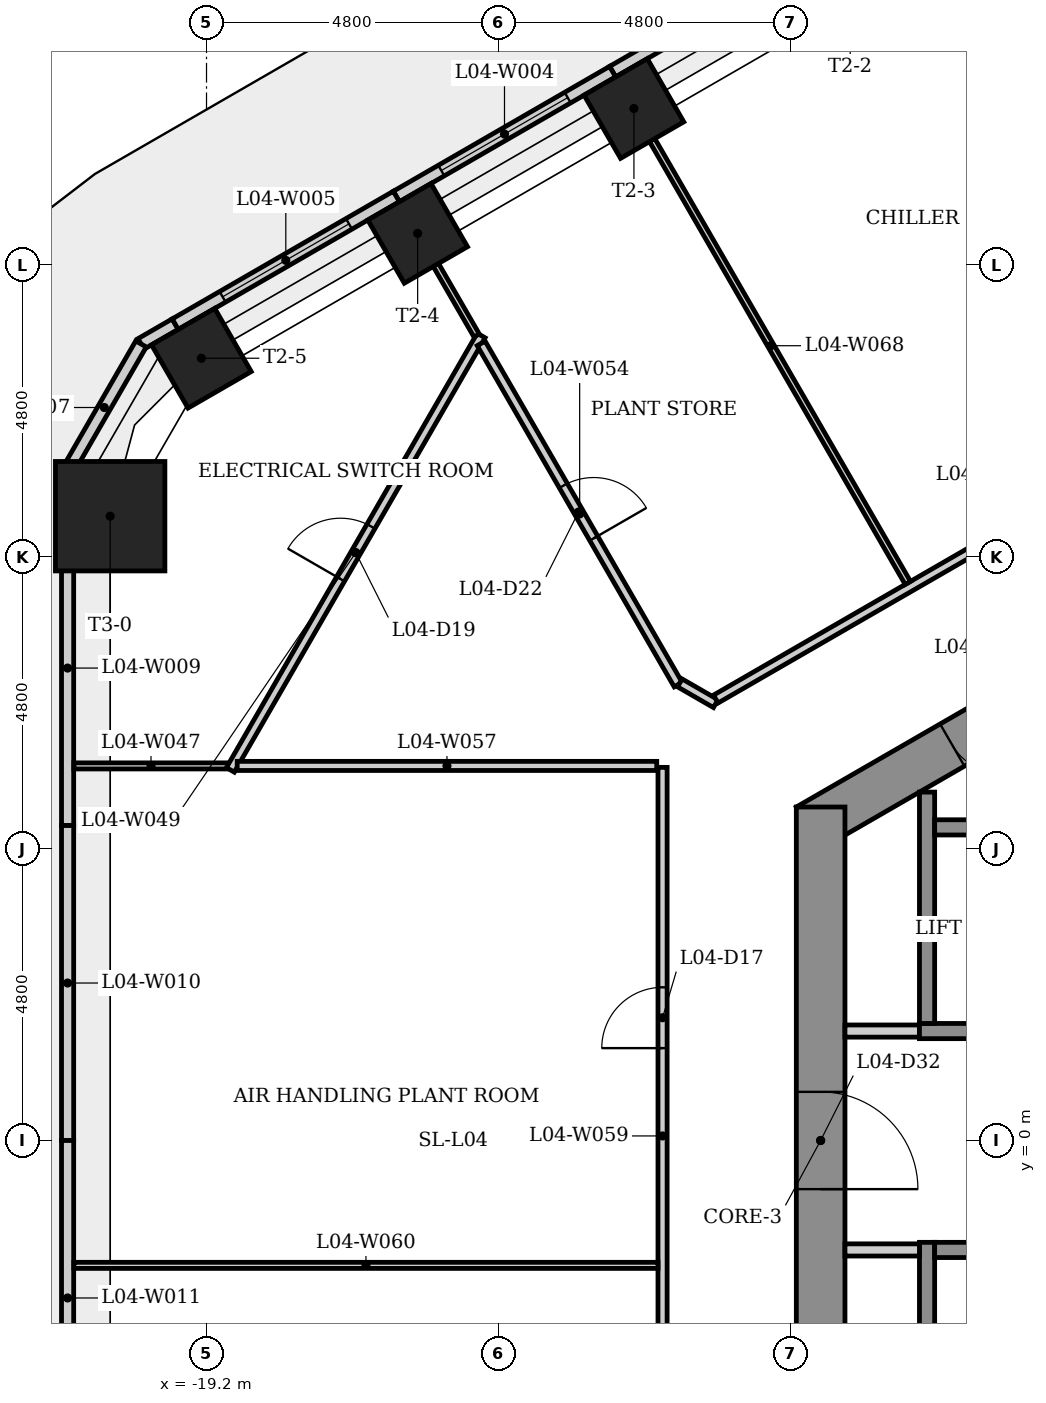
"""IFC4 building model, lengths in metres.
Left out: names, types, materials, properties, quantities, classifications, styles, units other than length and angle.
Written with IfcOpenShell. Run it as: python <this file> out.ifc"""

import sys

from ifc_helpers import new_model, si_unit, direction, frame, frame_2d, origin, origin_2d, place, context, subcontext, project, spatial, rectangle, extrude, element, fill, save


model = new_model("IFC4")
c1 = context("Model", 3, precision=1e-05, world=origin(), true_north=direction((0.0, 1.0)))
c2 = subcontext(c1, "Body", "Model", "MODEL_VIEW")
j1 = project(units=[si_unit("LENGTHUNIT", "METRE"), si_unit("PLANEANGLEUNIT", "RADIAN")], contexts=[c1])
p1 = place(None, origin())
s1 = spatial("IfcSite", under=j1, at=p1, CompositionType="ELEMENT")
p2 = place(p1, origin())
s2 = spatial("IfcBuilding", under=s1, at=p2, CompositionType="ELEMENT")
p3 = place(p2, frame((0.0, 0.0, 20.5)))
s3 = spatial("IfcBuildingStorey", under=s2, at=p3, CompositionType="ELEMENT", Elevation=20.5)
p4 = place(p3, frame((0.2, 10.623, 0.0), z_axis=(0.0, 0.0, 1.0), x_axis=(-0.866023993627, -0.500002442456, 0.0)))
e1 = element("IfcWall", 1, at=p4, inside=s3, PredefinedType="SHEAR", context=c2, shape_type="SweptSolid", body=[
    extrude(rectangle(XDim=10.97, YDim=0.8, at=frame_2d((5.485, 0.0))), origin(), (0.0, 0.0, 1.0), 5.0),
])
p5 = place(p4, frame((7.339, 0.0, 0.0)))
e2 = element("IfcOpeningElement", 2, at=p5, cuts=e1, PredefinedType="OPENING", context=c2, shape_type="SweptSolid", body=[
    extrude(rectangle(XDim=0.9, YDim=2.1, at=frame_2d((0.45, 1.05))), frame((0.0, 0.41, 0.0), z_axis=(0.0, -1.0, 0.0), x_axis=(1.0, 0.0, 0.0)), (0.0, 0.0, 1.0), 0.82),
])
p6 = place(p3, frame((-9.1, 5.485, 0.0), z_axis=(0.0, 0.0, 1.0), x_axis=(0.0, -1.0, 0.0)))
e3 = element("IfcWall", 3, at=p6, inside=s3, PredefinedType="SHEAR", context=c2, shape_type="SweptSolid", body=[
    extrude(rectangle(XDim=10.97, YDim=0.8, at=frame_2d((5.485, 0.0))), origin(), (0.0, 0.0, 1.0), 5.0),
])
p7 = place(p6, frame((4.685, 0.0, 0.0)))
e4 = element("IfcOpeningElement", 4, at=p7, cuts=e3, PredefinedType="OPENING", context=c2, shape_type="SweptSolid", body=[
    extrude(rectangle(XDim=1.6, YDim=2.1, at=frame_2d((0.8, 1.05))), frame((0.0, 0.41, 0.0), z_axis=(0.0, -1.0, 0.0), x_axis=(1.0, 0.0, 0.0)), (0.0, 0.0, 1.0), 0.82),
])
for number, where, z_axis, x_axis in (
    (5, (-12.171, 16.973, 0.0), (0.0, 0.0, 1.0), (-0.5, 0.866, 0.0)),
    (6, (-15.728, 14.92, 0.0), (0.0, 0.0, 1.0), (-0.5, 0.866, 0.0)),
    (7, (-19.285, 12.866, 0.0), (0.0, 0.0, 1.0), (-0.5, 0.866, 0.0)),
):
    element("IfcColumn", number, at=place(p3, frame(where, z_axis=z_axis, x_axis=x_axis)), inside=s3, PredefinedType="COLUMN", context=c2, shape_type="SweptSolid", body=[
        extrude(rectangle(XDim=1.2, YDim=1.2, at=origin_2d()), origin(), (0.0, 0.0, 1.0), 5.0),
    ])
p8 = place(p3, frame((-20.785, 10.268, 0.0), z_axis=(0.0, 0.0, 1.0), x_axis=(-1.0, 0.0, 0.0)))
e8 = element("IfcColumn", 8, at=p8, inside=s3, PredefinedType="COLUMN", context=c2, shape_type="SweptSolid", body=[
    extrude(rectangle(XDim=1.8, YDim=1.8, at=origin_2d()), origin(), (0.0, 0.0, 1.0), 5.0),
])
p9 = place(p3, frame((-8.964, 19.633, 0.0), z_axis=(0.0, 0.0, 1.0), x_axis=(-0.866021252249, -0.500007190601, 0.0)))
e9 = element("IfcWall", 9, at=p9, inside=s3, PredefinedType="SOLIDWALL", context=c2, shape_type="SweptSolid", body=[
    extrude(rectangle(XDim=4.107, YDim=0.2, at=frame_2d((2.053, 0.0))), origin(), (0.0, 0.0, 1.0), 4.88),
])
p10 = place(p9, frame((0.854, 0.0, 0.8)))
e10 = element("IfcOpeningElement", 10, at=p10, cuts=e9, PredefinedType="OPENING", context=c2, shape_type="SweptSolid", body=[
    extrude(rectangle(XDim=2.4, YDim=2.4, at=frame_2d((1.2, 1.2))), frame((0.0, 0.11, 0.0), z_axis=(0.0, -1.0, 0.0), x_axis=(1.0, 0.0, 0.0)), (0.0, 0.0, 1.0), 0.22),
])
p11 = place(p3, frame((-12.521, 17.579, 0.0), z_axis=(0.0, 0.0, 1.0), x_axis=(-0.866036113234, -0.499981450231, 0.0)))
e11 = element("IfcWall", 11, at=p11, inside=s3, PredefinedType="SOLIDWALL", context=c2, shape_type="SweptSolid", body=[
    extrude(rectangle(XDim=4.107, YDim=0.2, at=frame_2d((2.054, 0.0))), origin(), (0.0, 0.0, 1.0), 4.88),
])
p12 = place(p11, frame((0.854, 0.0, 0.8)))
e12 = element("IfcOpeningElement", 12, at=p12, cuts=e11, PredefinedType="OPENING", context=c2, shape_type="SweptSolid", body=[
    extrude(rectangle(XDim=2.4, YDim=2.4, at=frame_2d((1.2, 1.2))), frame((0.0, 0.11, 0.0), z_axis=(0.0, -1.0, 0.0), x_axis=(1.0, 0.0, 0.0)), (0.0, 0.0, 1.0), 0.22),
])
p13 = place(p3, frame((-16.078, 15.526, 0.0), z_axis=(0.0, 0.0, 1.0), x_axis=(-0.866016145416, -0.500016035621, 0.0)))
e13 = element("IfcWall", 13, at=p13, inside=s3, PredefinedType="SOLIDWALL", context=c2, shape_type="SweptSolid", body=[
    extrude(rectangle(XDim=4.199, YDim=0.2, at=frame_2d((2.1, 0.0))), origin(), (0.0, 0.0, 1.0), 4.88),
])
p14 = place(p13, frame((0.9, 0.0, 0.8)))
e14 = element("IfcOpeningElement", 14, at=p14, cuts=e13, PredefinedType="OPENING", context=c2, shape_type="SweptSolid", body=[
    extrude(rectangle(XDim=2.4, YDim=2.4, at=frame_2d((1.2, 1.2))), frame((0.0, 0.11, 0.0), z_axis=(0.0, -1.0, 0.0), x_axis=(1.0, 0.0, 0.0)), (0.0, 0.0, 1.0), 0.22),
])
p15 = place(p3, frame((-19.714, 13.426, 0.0), z_axis=(0.0, 0.0, 1.0), x_axis=(-0.865922902183, -0.50017749597, 0.0)))
e15 = element("IfcWall", 15, at=p15, inside=s3, PredefinedType="SOLIDWALL", context=c2, shape_type="SweptSolid", body=[
    extrude(rectangle(XDim=0.65, YDim=0.2, at=frame_2d((0.325, 0.0))), origin(), (0.0, 0.0, 1.0), 4.88),
])
p16 = place(p3, frame((-20.277, 13.101, 0.0), z_axis=(0.0, 0.0, 1.0), x_axis=(-0.499999616612, -0.866025625133, 0.0)))
e16 = element("IfcWall", 16, at=p16, inside=s3, PredefinedType="SOLIDWALL", context=c2, shape_type="SweptSolid", body=[
    extrude(rectangle(XDim=2.415, YDim=0.2, at=frame_2d((1.207, 0.0))), origin(), (0.0, 0.0, 1.0), 4.88),
])
p17 = place(p3, frame((-21.485, 11.01, 0.0), z_axis=(0.0, 0.0, 1.0), x_axis=(0.0, -1.0, 0.0)))
e17 = element("IfcWall", 17, at=p17, inside=s3, PredefinedType="SOLIDWALL", context=c2, shape_type="SweptSolid", body=[
    extrude(rectangle(XDim=0.65, YDim=0.2, at=frame_2d((0.325, 0.0))), origin(), (0.0, 0.0, 1.0), 4.88),
])
p18 = place(p3, frame((-21.485, 10.36, 0.0), z_axis=(0.0, 0.0, 1.0), x_axis=(0.0, -1.0, 0.0)))
e18 = element("IfcWall", 18, at=p18, inside=s3, PredefinedType="SOLIDWALL", context=c2, shape_type="SweptSolid", body=[
    extrude(rectangle(XDim=5.18, YDim=0.2, at=frame_2d((2.59, 0.0))), origin(), (0.0, 0.0, 1.0), 4.88),
])
for number, where, z_axis, x_axis in (
    (19, (-21.485, 5.18, 0.0), (0.0, 0.0, 1.0), (0.0, -1.0, 0.0)),
    (20, (-21.485, 0.0, 0.0), (0.0, 0.0, 1.0), (0.0, -1.0, 0.0)),
):
    element("IfcWall", number, at=place(p3, frame(where, z_axis=z_axis, x_axis=x_axis)), inside=s3, PredefinedType="SOLIDWALL", context=c2, shape_type="SweptSolid", body=[
        extrude(rectangle(XDim=5.18, YDim=0.2, at=frame_2d((2.59, 0.0))), origin(), (0.0, 0.0, 1.0), 4.88),
    ])
p19 = place(p3, frame((-21.381, 6.161, 0.0), z_axis=(0.0, 0.0, 1.0), x_axis=(1.0, 0.0, 0.0)))
e21 = element("IfcWall", 21, at=p19, inside=s3, PredefinedType="PARTITIONING", context=c2, shape_type="SweptSolid", body=[
    extrude(rectangle(XDim=2.535, YDim=0.1, at=frame_2d((1.268, 0.0))), origin(), (0.0, 0.0, 1.0), 4.65),
])
p20 = place(p3, frame((-18.808, 6.096, 0.0), z_axis=(0.0, 0.0, 1.0), x_axis=(0.499999979418, 0.866025415668, 0.0)))
e22 = element("IfcWall", 22, at=p20, inside=s3, PredefinedType="PARTITIONING", context=c2, shape_type="SweptSolid", body=[
    extrude(rectangle(XDim=8.25, YDim=0.15, at=frame_2d((4.125, 0.0))), origin(), (0.0, 0.0, 1.0), 4.65),
])
p21 = place(p20, frame((3.625, 0.0, 0.0)))
e23 = element("IfcOpeningElement", 23, at=p21, cuts=e22, PredefinedType="OPENING", context=c2, shape_type="SweptSolid", body=[
    extrude(rectangle(XDim=1.0, YDim=2.1, at=frame_2d((0.5, 1.05))), frame((0.0, 0.085, 0.0), z_axis=(0.0, -1.0, 0.0), x_axis=(1.0, 0.0, 0.0)), (0.0, 0.0, 1.0), 0.17),
])
p22 = place(p3, frame((-15.728, 14.92, 0.0), z_axis=(0.0, 0.0, 1.0), x_axis=(0.49998396455, -0.866034661658, 0.0)))
e24 = element("IfcWall", 24, at=p22, inside=s3, PredefinedType="PARTITIONING", context=c2, shape_type="SweptSolid", body=[
    extrude(rectangle(XDim=1.939, YDim=0.1, at=frame_2d((0.97, 0.0))), origin(), (0.0, 0.0, 1.0), 4.65),
])
p23 = place(p3, frame((-14.683, 13.11, 0.0), z_axis=(0.0, 0.0, 1.0), x_axis=(0.500005126634, -0.866022443901, 0.0)))
e25 = element("IfcWall", 25, at=p23, inside=s3, PredefinedType="PARTITIONING", context=c2, shape_type="SweptSolid", body=[
    extrude(rectangle(XDim=6.479, YDim=0.15, at=frame_2d((3.24, 0.0))), origin(), (0.0, 0.0, 1.0), 4.65),
])
p24 = place(p23, frame((2.702, 0.0, 0.0)))
e26 = element("IfcOpeningElement", 26, at=p24, cuts=e25, PredefinedType="OPENING", context=c2, shape_type="SweptSolid", body=[
    extrude(rectangle(XDim=1.0, YDim=2.1, at=frame_2d((0.5, 1.05))), frame((0.0, 0.085, 0.0), z_axis=(0.0, -1.0, 0.0), x_axis=(1.0, 0.0, 0.0)), (0.0, 0.0, 1.0), 0.17),
])
p25 = place(p3, frame((-11.796, 6.161, 0.0), z_axis=(0.0, 0.0, 1.0), x_axis=(-1.0, 0.0, 0.0)))
e27 = element("IfcWall", 27, at=p25, inside=s3, PredefinedType="PARTITIONING", context=c2, shape_type="SweptSolid", body=[
    extrude(rectangle(XDim=6.899, YDim=0.15, at=frame_2d((3.45, 0.0))), origin(), (0.0, 0.0, 1.0), 4.65),
])
p26 = place(p3, frame((-11.7, -5.987, 0.0), z_axis=(0.0, 0.0, 1.0), x_axis=(0.0, 1.0, 0.0)))
e28 = element("IfcWall", 28, at=p26, inside=s3, PredefinedType="PARTITIONING", context=c2, shape_type="SweptSolid", body=[
    extrude(rectangle(XDim=12.125, YDim=0.15, at=frame_2d((6.062, 0.0))), origin(), (0.0, 0.0, 1.0), 4.65),
])
p27 = place(p26, frame((7.507, 0.0, 0.0)))
e29 = element("IfcOpeningElement", 29, at=p27, cuts=e28, PredefinedType="OPENING", context=c2, shape_type="SweptSolid", body=[
    extrude(rectangle(XDim=1.0, YDim=2.1, at=frame_2d((0.5, 1.05))), frame((0.0, 0.085, 0.0), z_axis=(0.0, -1.0, 0.0), x_axis=(1.0, 0.0, 0.0)), (0.0, 0.0, 1.0), 0.17),
])
p28 = place(p3, frame((-11.775, -2.054, 0.0), z_axis=(0.0, 0.0, 1.0), x_axis=(-1.0, 0.0, 0.0)))
e30 = element("IfcWall", 30, at=p28, inside=s3, PredefinedType="PARTITIONING", context=c2, shape_type="SweptSolid", body=[
    extrude(rectangle(XDim=9.606, YDim=0.1, at=frame_2d((4.803, 0.0))), origin(), (0.0, 0.0, 1.0), 4.65),
])
p29 = place(p3, frame((-11.416, 7.526, 0.0), z_axis=(0.0, 0.0, 1.0), x_axis=(0.866209421097, -0.499681137129, 0.0)))
e31 = element("IfcWall", 31, at=p29, inside=s3, PredefinedType="PARTITIONING", context=c2, shape_type="SweptSolid", body=[
    extrude(rectangle(XDim=0.682, YDim=0.15, at=frame_2d((0.341, 0.0))), origin(), (0.0, 0.0, 1.0), 4.65),
])
p30 = place(p3, frame((-10.825, 7.26, 0.0), z_axis=(0.0, 0.0, 1.0), x_axis=(0.866026819738, 0.499997547488, 0.0)))
e32 = element("IfcWall", 32, at=p30, inside=s3, PredefinedType="PARTITIONING", context=c2, shape_type="SweptSolid", body=[
    extrude(rectangle(XDim=11.882, YDim=0.15, at=frame_2d((5.941, 0.0))), origin(), (0.0, 0.0, 1.0), 4.65),
])
p31 = place(p30, frame((7.264, 0.0, 0.0)))
e33 = element("IfcOpeningElement", 33, at=p31, cuts=e32, PredefinedType="OPENING", context=c2, shape_type="SweptSolid", body=[
    extrude(rectangle(XDim=1.0, YDim=2.1, at=frame_2d((0.5, 1.05))), frame((0.0, 0.085, 0.0), z_axis=(0.0, -1.0, 0.0), x_axis=(1.0, 0.0, 0.0)), (0.0, 0.0, 1.0), 0.17),
])
p32 = place(p3, frame((-8.7, 1.8, 0.0), z_axis=(0.0, 0.0, 1.0), x_axis=(1.0, 0.0, 0.0)))
e34 = element("IfcWall", 34, at=p32, inside=s3, PredefinedType="PARTITIONING", context=c2, shape_type="SweptSolid", body=[
    extrude(rectangle(XDim=1.225, YDim=0.2, at=frame_2d((0.613, 0.0))), origin(), (0.0, 0.0, 1.0), 4.65),
])
p33 = place(p3, frame((-7.666, 9.171, 0.0), z_axis=(0.0, 0.0, 1.0), x_axis=(-0.500009404554, 0.866019973994, 0.0)))
e35 = element("IfcWall", 35, at=p33, inside=s3, PredefinedType="PARTITIONING", context=c2, shape_type="SweptSolid", body=[
    extrude(rectangle(XDim=9.01, YDim=0.1, at=frame_2d((4.505, 0.0))), origin(), (0.0, 0.0, 1.0), 4.65),
])
p34 = place(p3, frame((-7.475, 1.8, 0.0), z_axis=(0.0, 0.0, 1.0), x_axis=(1.0, 0.0, 0.0)))
e36 = element("IfcWall", 36, at=p34, inside=s3, PredefinedType="SHEAR", context=c2, shape_type="SweptSolid", body=[
    extrude(rectangle(XDim=14.95, YDim=0.25, at=frame_2d((7.475, 0.0))), origin(), (0.0, 0.0, 1.0), 4.65),
])
p35 = place(p3, frame((-7.35, -5.73, 0.0), z_axis=(0.0, 0.0, 1.0), x_axis=(0.0, 1.0, 0.0)))
e37 = element("IfcWall", 37, at=p35, inside=s3, PredefinedType="SHEAR", context=c2, shape_type="SweptSolid", body=[
    extrude(rectangle(XDim=4.055, YDim=0.25, at=frame_2d((2.028, 0.0))), origin(), (0.0, 0.0, 1.0), 4.65),
])
p36 = place(p3, frame((-7.35, 1.925, 0.0), z_axis=(0.0, 0.0, 1.0), x_axis=(0.0, 1.0, 0.0)))
e38 = element("IfcWall", 38, at=p36, inside=s3, PredefinedType="SHEAR", context=c2, shape_type="SweptSolid", body=[
    extrude(rectangle(XDim=3.805, YDim=0.25, at=frame_2d((1.903, 0.0))), origin(), (0.0, 0.0, 1.0), 4.65),
])
p37 = place(p3, frame((-7.225, 5.15, 0.0), z_axis=(0.0, 0.0, 1.0), x_axis=(1.0, 0.0, 0.0)))
e39 = element("IfcWall", 39, at=p37, inside=s3, PredefinedType="SHEAR", context=c2, shape_type="SweptSolid", body=[
    extrude(rectangle(XDim=14.7, YDim=0.25, at=frame_2d((7.35, 0.0))), origin(), (0.0, 0.0, 1.0), 4.65),
])
p38 = place(p3, frame((-7.475, -1.8, 0.0), z_axis=(0.0, 0.0, 1.0), x_axis=(-1.0, 0.0, 0.0)))
e40 = element("IfcWall", 40, at=p38, inside=s3, PredefinedType="PARTITIONING", context=c2, shape_type="SweptSolid", body=[
    extrude(rectangle(XDim=1.225, YDim=0.2, at=frame_2d((0.613, 0.0))), origin(), (0.0, 0.0, 1.0), 4.65),
])
p39 = place(p3, frame((-7.225, -1.8, 0.0), z_axis=(0.0, 0.0, 1.0), x_axis=(1.0, 0.0, 0.0)))
e41 = element("IfcWall", 41, at=p39, inside=s3, PredefinedType="SHEAR", context=c2, shape_type="SweptSolid", body=[
    extrude(rectangle(XDim=14.7, YDim=0.25, at=frame_2d((7.35, 0.0))), origin(), (0.0, 0.0, 1.0), 4.65),
])
p40 = place(p39, frame((10.35, 0.0, 0.0)))
e42 = element("IfcOpeningElement", 42, at=p40, cuts=e41, PredefinedType="OPENING", context=c2, shape_type="SweptSolid", body=[
    extrude(rectangle(XDim=1.1, YDim=2.1, at=frame_2d((0.55, 1.05))), frame((0.0, 0.135, 0.0), z_axis=(0.0, -1.0, 0.0), x_axis=(1.0, 0.0, 0.0)), (0.0, 0.0, 1.0), 0.27),
])
p41 = place(p12, origin())
e43 = element("IfcWindow", 43, at=p41, inside=s3, PartitioningType="SINGLE_PANEL", PredefinedType="WINDOW", context=c2, shape_type="SweptSolid", body=[
    extrude(rectangle(XDim=2.4, YDim=2.4, at=frame_2d((1.2, 1.2))), frame((0.0, 0.03, 0.0), z_axis=(0.0, -1.0, 0.0), x_axis=(1.0, 0.0, 0.0)), (0.0, 0.0, 1.0), 0.06),
])
fill(e12, e43)
p42 = place(p14, origin())
e44 = element("IfcWindow", 44, at=p42, inside=s3, PartitioningType="SINGLE_PANEL", PredefinedType="WINDOW", context=c2, shape_type="SweptSolid", body=[
    extrude(rectangle(XDim=2.4, YDim=2.4, at=frame_2d((1.2, 1.2))), frame((0.0, 0.03, 0.0), z_axis=(0.0, -1.0, 0.0), x_axis=(1.0, 0.0, 0.0)), (0.0, 0.0, 1.0), 0.06),
])
fill(e14, e44)
p43 = place(p27, origin())
e45 = element("IfcDoor", 45, at=p43, inside=s3, OperationType="SINGLE_SWING_LEFT", PredefinedType="DOOR", context=c2, shape_type="SweptSolid", body=[
    extrude(rectangle(XDim=1.0, YDim=2.1, at=frame_2d((0.5, 1.05))), frame((0.0, 0.025, 0.0), z_axis=(0.0, -1.0, 0.0), x_axis=(1.0, 0.0, 0.0)), (0.0, 0.0, 1.0), 0.05),
])
fill(e29, e45)
p44 = place(p21, origin())
e46 = element("IfcDoor", 46, at=p44, inside=s3, OperationType="SINGLE_SWING_LEFT", PredefinedType="DOOR", context=c2, shape_type="SweptSolid", body=[
    extrude(rectangle(XDim=1.0, YDim=2.1, at=frame_2d((0.5, 1.05))), frame((0.0, 0.025, 0.0), z_axis=(0.0, -1.0, 0.0), x_axis=(1.0, 0.0, 0.0)), (0.0, 0.0, 1.0), 0.05),
])
fill(e23, e46)
p45 = place(p24, origin())
e47 = element("IfcDoor", 47, at=p45, inside=s3, OperationType="SINGLE_SWING_RIGHT", PredefinedType="DOOR", context=c2, shape_type="SweptSolid", body=[
    extrude(rectangle(XDim=1.0, YDim=2.1, at=frame_2d((0.5, 1.05))), frame((0.0, 0.025, 0.0), z_axis=(0.0, -1.0, 0.0), x_axis=(1.0, 0.0, 0.0)), (0.0, 0.0, 1.0), 0.05),
])
fill(e26, e47)
p46 = place(p5, origin())
e48 = element("IfcDoor", 48, at=p46, inside=s3, OperationType="SINGLE_SWING_LEFT", PredefinedType="DOOR", context=c2, shape_type="SweptSolid", body=[
    extrude(rectangle(XDim=0.9, YDim=2.1, at=frame_2d((0.45, 1.05))), frame((0.0, 0.025, 0.0), z_axis=(0.0, -1.0, 0.0), x_axis=(1.0, 0.0, 0.0)), (0.0, 0.0, 1.0), 0.05),
])
fill(e2, e48)
p47 = place(p7, origin())
e49 = element("IfcDoor", 49, at=p47, inside=s3, OperationType="SINGLE_SWING_RIGHT", PredefinedType="DOOR", context=c2, shape_type="SweptSolid", body=[
    extrude(rectangle(XDim=1.6, YDim=2.1, at=frame_2d((0.8, 1.05))), frame((0.0, 0.025, 0.0), z_axis=(0.0, -1.0, 0.0), x_axis=(1.0, 0.0, 0.0)), (0.0, 0.0, 1.0), 0.05),
])
fill(e4, e49)
save(model, sys.argv[1])
